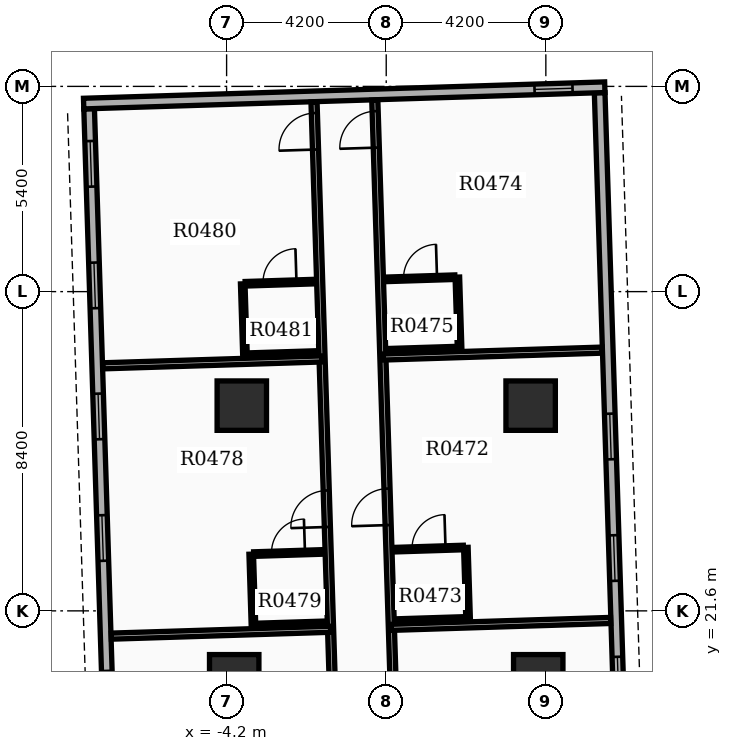
"""IFC4 building model, lengths in metres.
Left out: names, types, materials, properties, quantities, classifications, styles, units other than length and angle.
Written with IfcOpenShell. Run it as: python <this file> out.ifc"""

import sys

from ifc_helpers import new_model, si_unit, direction, frame, frame_2d, origin, origin_2d, place, context, subcontext, project, spatial, rectangle, extrude, element, fill, save


model = new_model("IFC4")
c1 = context("Model", 3, precision=1e-05, world=origin(), true_north=direction((0.0, 1.0)))
c2 = subcontext(c1, "Body", "Model", "MODEL_VIEW")
j1 = project(units=[si_unit("LENGTHUNIT", "METRE"), si_unit("PLANEANGLEUNIT", "RADIAN")], contexts=[c1])
p1 = place(None, origin())
s1 = spatial("IfcSite", under=j1, at=p1, CompositionType="ELEMENT")
p2 = place(p1, origin())
s2 = spatial("IfcBuilding", under=s1, at=p2, CompositionType="ELEMENT")
p3 = place(p2, frame((0.0, 0.0, 31.5)))
s3 = spatial("IfcBuildingStorey", under=s2, at=p3, CompositionType="ELEMENT", Elevation=31.5)
for number, where, z_axis, x_axis in (
    (1, (-4.0, 19.8, 0.0), (0.0, 0.0, 1.0), (1.0, 0.0, 0.0)),
    (2, (4.0, 19.8, 0.0), (0.0, 0.0, 1.0), (1.0, 0.0, 0.0)),
    (3, (-3.8, 27.0, 0.0), (0.0, 0.0, 1.0), (1.0, 0.0, 0.0)),
    (4, (3.8, 27.0, 0.0), (0.0, 0.0, 1.0), (1.0, 0.0, 0.0)),
):
    element("IfcColumn", number, at=place(p3, frame(where, z_axis=z_axis, x_axis=x_axis)), inside=s3, PredefinedType="COLUMN", context=c2, shape_type="SweptSolid", body=[
        extrude(rectangle(XDim=1.3, YDim=1.3, at=origin_2d()), origin(), (0.0, 0.0, 1.0), 3.9),
    ])
p4 = place(p3, frame((6.247, 15.144, 0.0), z_axis=(0.0, 0.0, 1.0), x_axis=(-0.031398187845, 0.999506955354, 0.0)))
e5 = element("IfcWall", 5, at=p4, inside=s3, PredefinedType="STANDARD", context=c2, shape_type="SweptSolid", body=[
    extrude(rectangle(XDim=20.1, YDim=0.28, at=frame_2d((10.05, 0.0))), origin(), (0.0, 0.0, 1.0), 2.91),
])
p5 = place(p4, frame((0.85, 0.0, 0.8)))
e6 = element("IfcOpeningElement", 6, at=p5, cuts=e5, PredefinedType="OPENING", context=c2, shape_type="SweptSolid", body=[
    extrude(rectangle(XDim=1.2, YDim=1.6, at=frame_2d((0.6, 0.8))), frame((0.0, 0.15, 0.0), z_axis=(0.0, -1.0, 0.0), x_axis=(1.0, 0.0, 0.0)), (0.0, 0.0, 1.0), 0.3),
])
p6 = place(p4, frame((4.05, 0.0, 0.8)))
e7 = element("IfcOpeningElement", 7, at=p6, cuts=e5, PredefinedType="OPENING", context=c2, shape_type="SweptSolid", body=[
    extrude(rectangle(XDim=1.2, YDim=1.6, at=frame_2d((0.6, 0.8))), frame((0.0, 0.15, 0.0), z_axis=(0.0, -1.0, 0.0), x_axis=(1.0, 0.0, 0.0)), (0.0, 0.0, 1.0), 0.3),
])
p7 = place(p4, frame((7.25, 0.0, 0.8)))
e8 = element("IfcOpeningElement", 8, at=p7, cuts=e5, PredefinedType="OPENING", context=c2, shape_type="SweptSolid", body=[
    extrude(rectangle(XDim=1.2, YDim=1.6, at=frame_2d((0.6, 0.8))), frame((0.0, 0.15, 0.0), z_axis=(0.0, -1.0, 0.0), x_axis=(1.0, 0.0, 0.0)), (0.0, 0.0, 1.0), 0.3),
])
p8 = place(p4, frame((10.45, 0.0, 0.8)))
e9 = element("IfcOpeningElement", 9, at=p8, cuts=e5, PredefinedType="OPENING", context=c2, shape_type="SweptSolid", body=[
    extrude(rectangle(XDim=1.2, YDim=1.6, at=frame_2d((0.6, 0.8))), frame((0.0, 0.15, 0.0), z_axis=(0.0, -1.0, 0.0), x_axis=(1.0, 0.0, 0.0)), (0.0, 0.0, 1.0), 0.3),
])
p9 = place(p3, frame((-7.817, 34.812, 0.0), z_axis=(0.0, 0.0, 1.0), x_axis=(0.031410322165, -0.999506574096, 0.0)))
e10 = element("IfcWall", 10, at=p9, inside=s3, PredefinedType="STANDARD", context=c2, shape_type="SweptSolid", body=[
    extrude(rectangle(XDim=20.1, YDim=0.28, at=frame_2d((10.05, 0.0))), origin(), (0.0, 0.0, 1.0), 2.91),
])
p10 = place(p9, frame((0.85, 0.0, 0.8)))
e11 = element("IfcOpeningElement", 11, at=p10, cuts=e10, PredefinedType="OPENING", context=c2, shape_type="SweptSolid", body=[
    extrude(rectangle(XDim=1.2, YDim=1.6, at=frame_2d((0.6, 0.8))), frame((0.0, 0.15, 0.0), z_axis=(0.0, -1.0, 0.0), x_axis=(1.0, 0.0, 0.0)), (0.0, 0.0, 1.0), 0.3),
])
p11 = place(p9, frame((4.05, 0.0, 0.8)))
e12 = element("IfcOpeningElement", 12, at=p11, cuts=e10, PredefinedType="OPENING", context=c2, shape_type="SweptSolid", body=[
    extrude(rectangle(XDim=1.2, YDim=1.6, at=frame_2d((0.6, 0.8))), frame((0.0, 0.15, 0.0), z_axis=(0.0, -1.0, 0.0), x_axis=(1.0, 0.0, 0.0)), (0.0, 0.0, 1.0), 0.3),
])
p12 = place(p9, frame((7.5, 0.0, 0.8)))
e13 = element("IfcOpeningElement", 13, at=p12, cuts=e10, PredefinedType="OPENING", context=c2, shape_type="SweptSolid", body=[
    extrude(rectangle(XDim=1.2, YDim=1.6, at=frame_2d((0.6, 0.8))), frame((0.0, 0.15, 0.0), z_axis=(0.0, -1.0, 0.0), x_axis=(1.0, 0.0, 0.0)), (0.0, 0.0, 1.0), 0.3),
])
p13 = place(p9, frame((10.7, 0.0, 0.8)))
e14 = element("IfcOpeningElement", 14, at=p13, cuts=e10, PredefinedType="OPENING", context=c2, shape_type="SweptSolid", body=[
    extrude(rectangle(XDim=1.2, YDim=1.6, at=frame_2d((0.6, 0.8))), frame((0.0, 0.15, 0.0), z_axis=(0.0, -1.0, 0.0), x_axis=(1.0, 0.0, 0.0)), (0.0, 0.0, 1.0), 0.3),
])
p14 = place(p9, frame((14.799, 0.0, 0.85)))
e15 = element("IfcOpeningElement", 15, at=p14, cuts=e10, PredefinedType="OPENING", context=c2, shape_type="SweptSolid", body=[
    extrude(rectangle(XDim=1.2, YDim=1.6, at=frame_2d((0.6, 0.8))), frame((0.0, 0.15, 0.0), z_axis=(0.0, -1.0, 0.0), x_axis=(1.0, 0.0, 0.0)), (0.0, 0.0, 1.0), 0.3),
])
p15 = place(p3, frame((5.752, 35.378, 0.0), z_axis=(0.0, 0.0, 1.0), x_axis=(-0.999506679556, -0.031406966164, 0.0)))
e16 = element("IfcWall", 16, at=p15, inside=s3, PredefinedType="STANDARD", context=c2, shape_type="SweptSolid", body=[
    extrude(rectangle(XDim=13.72, YDim=0.28, at=frame_2d((6.86, 0.0))), origin(), (0.0, 0.0, 1.0), 2.91),
])
p16 = place(p15, frame((0.85, 0.0, 0.85)))
e17 = element("IfcOpeningElement", 17, at=p16, cuts=e16, PredefinedType="OPENING", context=c2, shape_type="SweptSolid", body=[
    extrude(rectangle(XDim=1.0, YDim=1.5, at=frame_2d((0.5, 0.75))), frame((0.0, 0.15, 0.0), z_axis=(0.0, -1.0, 0.0), x_axis=(1.0, 0.0, 0.0)), (0.0, 0.0, 1.0), 0.3),
])
p17 = place(p3, frame((0.333, 14.868, 0.0), z_axis=(0.0, 0.0, 1.0), x_axis=(-0.031416030536, 0.99950639469, 0.0)))
e18 = element("IfcWall", 18, at=p17, inside=s3, PredefinedType="PARTITIONING", context=c2, shape_type="SweptSolid", body=[
    extrude(rectangle(XDim=20.182, YDim=0.16, at=frame_2d((10.091, 0.0))), origin(), (0.0, 0.0, 1.0), 2.9),
])
p18 = place(p17, frame((2.61, 0.0, 0.0)))
e19 = element("IfcOpeningElement", 19, at=p18, cuts=e18, PredefinedType="OPENING", context=c2, shape_type="SweptSolid", body=[
    extrude(rectangle(XDim=0.96, YDim=2.15, at=frame_2d((0.48, 1.075))), frame((0.0, 0.09, 0.0), z_axis=(0.0, -1.0, 0.0), x_axis=(1.0, 0.0, 0.0)), (0.0, 0.0, 1.0), 0.18),
])
p19 = place(p17, frame((8.994, 0.0, 0.0)))
e20 = element("IfcOpeningElement", 20, at=p19, cuts=e18, PredefinedType="OPENING", context=c2, shape_type="SweptSolid", body=[
    extrude(rectangle(XDim=0.96, YDim=2.15, at=frame_2d((0.48, 1.075))), frame((0.0, 0.09, 0.0), z_axis=(0.0, -1.0, 0.0), x_axis=(1.0, 0.0, 0.0)), (0.0, 0.0, 1.0), 0.18),
])
p20 = place(p17, frame((18.93, 0.0, 0.0)))
e21 = element("IfcOpeningElement", 21, at=p20, cuts=e18, PredefinedType="OPENING", context=c2, shape_type="SweptSolid", body=[
    extrude(rectangle(XDim=0.96, YDim=2.15, at=frame_2d((0.48, 1.075))), frame((0.0, 0.09, 0.0), z_axis=(0.0, -1.0, 0.0), x_axis=(1.0, 0.0, 0.0)), (0.0, 0.0, 1.0), 0.18),
])
p21 = place(p3, frame((0.135, 21.167, 0.0), z_axis=(0.0, 0.0, 1.0), x_axis=(0.999507360361, 0.031385292484, 0.0)))
e22 = element("IfcWall", 22, at=p21, inside=s3, PredefinedType="PARTITIONING", context=c2, shape_type="SweptSolid", body=[
    extrude(rectangle(XDim=5.772, YDim=0.16, at=frame_2d((2.886, 0.0))), origin(), (0.0, 0.0, 1.0), 2.9),
])
p22 = place(p3, frame((-0.088, 28.279, 0.0), z_axis=(0.0, 0.0, 1.0), x_axis=(0.999507402024, 0.031383965651, 0.0)))
e23 = element("IfcWall", 23, at=p22, inside=s3, PredefinedType="PARTITIONING", context=c2, shape_type="SweptSolid", body=[
    extrude(rectangle(XDim=5.772, YDim=0.16, at=frame_2d((2.886, 0.0))), origin(), (0.0, 0.0, 1.0), 2.9),
])
p23 = place(p3, frame((0.211, 23.21, 0.0), z_axis=(0.0, 0.0, 1.0), x_axis=(0.999511421504, 0.031255692016, 0.0)))
e24 = element("IfcWall", 24, at=p23, inside=s3, PredefinedType="PARTITIONING", context=c2, shape_type="SweptSolid", body=[
    extrude(rectangle(XDim=1.82, YDim=0.12, at=frame_2d((0.91, 0.0))), origin(), (0.0, 0.0, 1.0), 2.9),
])
p24 = place(p23, frame((0.47, 0.0, 0.0)))
e25 = element("IfcOpeningElement", 25, at=p24, cuts=e24, PredefinedType="OPENING", context=c2, shape_type="SweptSolid", body=[
    extrude(rectangle(XDim=0.88, YDim=2.1, at=frame_2d((0.44, 1.05))), frame((0.0, 0.07, 0.0), z_axis=(0.0, -1.0, 0.0), x_axis=(1.0, 0.0, 0.0)), (0.0, 0.0, 1.0), 0.14),
])
p25 = place(p3, frame((0.27, 21.331, 0.0), z_axis=(0.0, 0.0, 1.0), x_axis=(0.999507221803, 0.031389704724, 0.0)))
e26 = element("IfcWall", 26, at=p25, inside=s3, PredefinedType="PARTITIONING", context=c2, shape_type="SweptSolid", body=[
    extrude(rectangle(XDim=1.82, YDim=0.12, at=frame_2d((0.91, 0.0))), origin(), (0.0, 0.0, 1.0), 2.9),
])
p26 = place(p3, frame((2.154, 21.39, 0.0), z_axis=(0.0, 0.0, 1.0), x_axis=(-0.031425292588, 0.999506103526, 0.0)))
e27 = element("IfcWall", 27, at=p26, inside=s3, PredefinedType="PARTITIONING", context=c2, shape_type="SweptSolid", body=[
    extrude(rectangle(XDim=1.88, YDim=0.12, at=frame_2d((0.94, 0.0))), origin(), (0.0, 0.0, 1.0), 2.9),
])
p27 = place(p3, frame((-0.012, 30.323, 0.0), z_axis=(0.0, 0.0, 1.0), x_axis=(0.999507221803, 0.031389704724, 0.0)))
e28 = element("IfcWall", 28, at=p27, inside=s3, PredefinedType="PARTITIONING", context=c2, shape_type="SweptSolid", body=[
    extrude(rectangle(XDim=1.82, YDim=0.12, at=frame_2d((0.91, 0.0))), origin(), (0.0, 0.0, 1.0), 2.9),
])
p28 = place(p27, frame((0.47, 0.0, 0.0)))
e29 = element("IfcOpeningElement", 29, at=p28, cuts=e28, PredefinedType="OPENING", context=c2, shape_type="SweptSolid", body=[
    extrude(rectangle(XDim=0.88, YDim=2.1, at=frame_2d((0.44, 1.05))), frame((0.0, 0.07, 0.0), z_axis=(0.0, -1.0, 0.0), x_axis=(1.0, 0.0, 0.0)), (0.0, 0.0, 1.0), 0.14),
])
p29 = place(p3, frame((0.047, 28.444, 0.0), z_axis=(0.0, 0.0, 1.0), x_axis=(0.999507221803, 0.031389704724, 0.0)))
e30 = element("IfcWall", 30, at=p29, inside=s3, PredefinedType="PARTITIONING", context=c2, shape_type="SweptSolid", body=[
    extrude(rectangle(XDim=1.82, YDim=0.12, at=frame_2d((0.91, 0.0))), origin(), (0.0, 0.0, 1.0), 2.9),
])
p30 = place(p3, frame((1.931, 28.503, 0.0), z_axis=(0.0, 0.0, 1.0), x_axis=(-0.031425292588, 0.999506103526, 0.0)))
e31 = element("IfcWall", 31, at=p30, inside=s3, PredefinedType="PARTITIONING", context=c2, shape_type="SweptSolid", body=[
    extrude(rectangle(XDim=1.88, YDim=0.12, at=frame_2d((0.94, 0.0))), origin(), (0.0, 0.0, 1.0), 2.9),
])
p31 = place(p3, frame((-1.266, 14.817, 0.0), z_axis=(0.0, 0.0, 1.0), x_axis=(-0.031403565719, 0.9995067864, 0.0)))
e32 = element("IfcWall", 32, at=p31, inside=s3, PredefinedType="PARTITIONING", context=c2, shape_type="SweptSolid", body=[
    extrude(rectangle(XDim=20.182, YDim=0.16, at=frame_2d((10.091, 0.0))), origin(), (0.0, 0.0, 1.0), 2.9),
])
p32 = place(p31, frame((2.61, 0.0, 0.0)))
e33 = element("IfcOpeningElement", 33, at=p32, cuts=e32, PredefinedType="OPENING", context=c2, shape_type="SweptSolid", body=[
    extrude(rectangle(XDim=0.96, YDim=2.15, at=frame_2d((0.48, 1.075))), frame((0.0, 0.09, 0.0), z_axis=(0.0, -1.0, 0.0), x_axis=(1.0, 0.0, 0.0)), (0.0, 0.0, 1.0), 0.18),
])
p33 = place(p31, frame((8.994, 0.0, 0.0)))
e34 = element("IfcOpeningElement", 34, at=p33, cuts=e32, PredefinedType="OPENING", context=c2, shape_type="SweptSolid", body=[
    extrude(rectangle(XDim=0.96, YDim=2.15, at=frame_2d((0.48, 1.075))), frame((0.0, 0.09, 0.0), z_axis=(0.0, -1.0, 0.0), x_axis=(1.0, 0.0, 0.0)), (0.0, 0.0, 1.0), 0.18),
])
p34 = place(p31, frame((18.93, 0.0, 0.0)))
e35 = element("IfcOpeningElement", 35, at=p34, cuts=e32, PredefinedType="OPENING", context=c2, shape_type="SweptSolid", body=[
    extrude(rectangle(XDim=0.96, YDim=2.15, at=frame_2d((0.48, 1.075))), frame((0.0, 0.09, 0.0), z_axis=(0.0, -1.0, 0.0), x_axis=(1.0, 0.0, 0.0)), (0.0, 0.0, 1.0), 0.18),
])
p35 = place(p3, frame((-1.464, 21.116, 0.0), z_axis=(0.0, 0.0, 1.0), x_axis=(-0.999506032581, -0.031427548972, 0.0)))
e36 = element("IfcWall", 36, at=p35, inside=s3, PredefinedType="PARTITIONING", context=c2, shape_type="SweptSolid", body=[
    extrude(rectangle(XDim=5.772, YDim=0.16, at=frame_2d((2.886, 0.0))), origin(), (0.0, 0.0, 1.0), 2.9),
])
p36 = place(p3, frame((-1.688, 28.229, 0.0), z_axis=(0.0, 0.0, 1.0), x_axis=(-0.999506074356, -0.031426220357, 0.0)))
e37 = element("IfcWall", 37, at=p36, inside=s3, PredefinedType="PARTITIONING", context=c2, shape_type="SweptSolid", body=[
    extrude(rectangle(XDim=5.772, YDim=0.16, at=frame_2d((2.886, 0.0))), origin(), (0.0, 0.0, 1.0), 2.9),
])
p37 = place(p3, frame((-3.487, 23.094, 0.0), z_axis=(0.0, 0.0, 1.0), x_axis=(0.999511421504, 0.031255692016, 0.0)))
e38 = element("IfcWall", 38, at=p37, inside=s3, PredefinedType="PARTITIONING", context=c2, shape_type="SweptSolid", body=[
    extrude(rectangle(XDim=1.82, YDim=0.12, at=frame_2d((0.91, 0.0))), origin(), (0.0, 0.0, 1.0), 2.9),
])
p38 = place(p37, frame((0.47, 0.0, 0.0)))
e39 = element("IfcOpeningElement", 39, at=p38, cuts=e38, PredefinedType="OPENING", context=c2, shape_type="SweptSolid", body=[
    extrude(rectangle(XDim=0.88, YDim=2.1, at=frame_2d((0.44, 1.05))), frame((0.0, 0.07, 0.0), z_axis=(0.0, -1.0, 0.0), x_axis=(1.0, 0.0, 0.0)), (0.0, 0.0, 1.0), 0.14),
])
p39 = place(p3, frame((-3.428, 21.215, 0.0), z_axis=(0.0, 0.0, 1.0), x_axis=(0.999507221803, 0.031389704724, 0.0)))
e40 = element("IfcWall", 40, at=p39, inside=s3, PredefinedType="PARTITIONING", context=c2, shape_type="SweptSolid", body=[
    extrude(rectangle(XDim=1.82, YDim=0.12, at=frame_2d((0.91, 0.0))), origin(), (0.0, 0.0, 1.0), 2.9),
])
p40 = place(p3, frame((-3.493, 21.213, 0.0), z_axis=(0.0, 0.0, 1.0), x_axis=(-0.031425292588, 0.999506103526, 0.0)))
e41 = element("IfcWall", 41, at=p40, inside=s3, PredefinedType="PARTITIONING", context=c2, shape_type="SweptSolid", body=[
    extrude(rectangle(XDim=1.88, YDim=0.12, at=frame_2d((0.94, 0.0))), origin(), (0.0, 0.0, 1.0), 2.9),
])
p41 = place(p3, frame((-3.711, 30.206, 0.0), z_axis=(0.0, 0.0, 1.0), x_axis=(0.999507221803, 0.031389704724, 0.0)))
e42 = element("IfcWall", 42, at=p41, inside=s3, PredefinedType="PARTITIONING", context=c2, shape_type="SweptSolid", body=[
    extrude(rectangle(XDim=1.82, YDim=0.12, at=frame_2d((0.91, 0.0))), origin(), (0.0, 0.0, 1.0), 2.9),
])
p42 = place(p41, frame((0.47, 0.0, 0.0)))
e43 = element("IfcOpeningElement", 43, at=p42, cuts=e42, PredefinedType="OPENING", context=c2, shape_type="SweptSolid", body=[
    extrude(rectangle(XDim=0.88, YDim=2.1, at=frame_2d((0.44, 1.05))), frame((0.0, 0.07, 0.0), z_axis=(0.0, -1.0, 0.0), x_axis=(1.0, 0.0, 0.0)), (0.0, 0.0, 1.0), 0.14),
])
p43 = place(p3, frame((-3.652, 28.327, 0.0), z_axis=(0.0, 0.0, 1.0), x_axis=(0.999507221803, 0.031389704724, 0.0)))
e44 = element("IfcWall", 44, at=p43, inside=s3, PredefinedType="PARTITIONING", context=c2, shape_type="SweptSolid", body=[
    extrude(rectangle(XDim=1.82, YDim=0.12, at=frame_2d((0.91, 0.0))), origin(), (0.0, 0.0, 1.0), 2.9),
])
p44 = place(p3, frame((-3.717, 28.325, 0.0), z_axis=(0.0, 0.0, 1.0), x_axis=(-0.031425292588, 0.999506103526, 0.0)))
e45 = element("IfcWall", 45, at=p44, inside=s3, PredefinedType="PARTITIONING", context=c2, shape_type="SweptSolid", body=[
    extrude(rectangle(XDim=1.88, YDim=0.12, at=frame_2d((0.94, 0.0))), origin(), (0.0, 0.0, 1.0), 2.9),
])
p45 = place(p6, origin())
e46 = element("IfcWindow", 46, at=p45, inside=s3, PartitioningType="SINGLE_PANEL", PredefinedType="WINDOW", context=c2, shape_type="SweptSolid", body=[
    extrude(rectangle(XDim=1.2, YDim=1.6, at=frame_2d((0.6, 0.8))), frame((0.0, 0.03, 0.0), z_axis=(0.0, -1.0, 0.0), x_axis=(1.0, 0.0, 0.0)), (0.0, 0.0, 1.0), 0.06),
])
fill(e7, e46)
p46 = place(p7, origin())
e47 = element("IfcWindow", 47, at=p46, inside=s3, PartitioningType="SINGLE_PANEL", PredefinedType="WINDOW", context=c2, shape_type="SweptSolid", body=[
    extrude(rectangle(XDim=1.2, YDim=1.6, at=frame_2d((0.6, 0.8))), frame((0.0, 0.03, 0.0), z_axis=(0.0, -1.0, 0.0), x_axis=(1.0, 0.0, 0.0)), (0.0, 0.0, 1.0), 0.06),
])
fill(e8, e47)
p47 = place(p8, origin())
e48 = element("IfcWindow", 48, at=p47, inside=s3, PartitioningType="SINGLE_PANEL", PredefinedType="WINDOW", context=c2, shape_type="SweptSolid", body=[
    extrude(rectangle(XDim=1.2, YDim=1.6, at=frame_2d((0.6, 0.8))), frame((0.0, 0.03, 0.0), z_axis=(0.0, -1.0, 0.0), x_axis=(1.0, 0.0, 0.0)), (0.0, 0.0, 1.0), 0.06),
])
fill(e9, e48)
p48 = place(p10, origin())
e49 = element("IfcWindow", 49, at=p48, inside=s3, PartitioningType="SINGLE_PANEL", PredefinedType="WINDOW", context=c2, shape_type="SweptSolid", body=[
    extrude(rectangle(XDim=1.2, YDim=1.6, at=frame_2d((0.6, 0.8))), frame((0.0, 0.03, 0.0), z_axis=(0.0, -1.0, 0.0), x_axis=(1.0, 0.0, 0.0)), (0.0, 0.0, 1.0), 0.06),
])
fill(e11, e49)
p49 = place(p11, origin())
e50 = element("IfcWindow", 50, at=p49, inside=s3, PartitioningType="SINGLE_PANEL", PredefinedType="WINDOW", context=c2, shape_type="SweptSolid", body=[
    extrude(rectangle(XDim=1.2, YDim=1.6, at=frame_2d((0.6, 0.8))), frame((0.0, 0.03, 0.0), z_axis=(0.0, -1.0, 0.0), x_axis=(1.0, 0.0, 0.0)), (0.0, 0.0, 1.0), 0.06),
])
fill(e12, e50)
p50 = place(p12, origin())
e51 = element("IfcWindow", 51, at=p50, inside=s3, PartitioningType="SINGLE_PANEL", PredefinedType="WINDOW", context=c2, shape_type="SweptSolid", body=[
    extrude(rectangle(XDim=1.2, YDim=1.6, at=frame_2d((0.6, 0.8))), frame((0.0, 0.03, 0.0), z_axis=(0.0, -1.0, 0.0), x_axis=(1.0, 0.0, 0.0)), (0.0, 0.0, 1.0), 0.06),
])
fill(e13, e51)
p51 = place(p13, origin())
e52 = element("IfcWindow", 52, at=p51, inside=s3, PartitioningType="SINGLE_PANEL", PredefinedType="WINDOW", context=c2, shape_type="SweptSolid", body=[
    extrude(rectangle(XDim=1.2, YDim=1.6, at=frame_2d((0.6, 0.8))), frame((0.0, 0.03, 0.0), z_axis=(0.0, -1.0, 0.0), x_axis=(1.0, 0.0, 0.0)), (0.0, 0.0, 1.0), 0.06),
])
fill(e14, e52)
p52 = place(p16, origin())
e53 = element("IfcWindow", 53, at=p52, inside=s3, PartitioningType="SINGLE_PANEL", PredefinedType="WINDOW", context=c2, shape_type="SweptSolid", body=[
    extrude(rectangle(XDim=1.0, YDim=1.5, at=frame_2d((0.5, 0.75))), frame((0.0, 0.03, 0.0), z_axis=(0.0, -1.0, 0.0), x_axis=(1.0, 0.0, 0.0)), (0.0, 0.0, 1.0), 0.06),
])
fill(e17, e53)
p53 = place(p14, origin())
e54 = element("IfcWindow", 54, at=p53, inside=s3, PartitioningType="SINGLE_PANEL", PredefinedType="WINDOW", context=c2, shape_type="SweptSolid", body=[
    extrude(rectangle(XDim=1.2, YDim=1.6, at=frame_2d((0.6, 0.8))), frame((0.0, 0.03, 0.0), z_axis=(0.0, -1.0, 0.0), x_axis=(1.0, 0.0, 0.0)), (0.0, 0.0, 1.0), 0.06),
])
fill(e15, e54)
p54 = place(p19, origin())
e55 = element("IfcDoor", 55, at=p54, inside=s3, OperationType="SINGLE_SWING_LEFT", PredefinedType="DOOR", context=c2, shape_type="SweptSolid", body=[
    extrude(rectangle(XDim=0.96, YDim=2.15, at=frame_2d((0.48, 1.075))), frame((0.0, 0.025, 0.0), z_axis=(0.0, -1.0, 0.0), x_axis=(1.0, 0.0, 0.0)), (0.0, 0.0, 1.0), 0.05),
])
fill(e20, e55)
p55 = place(p24, origin())
e56 = element("IfcDoor", 56, at=p55, inside=s3, OperationType="SINGLE_SWING_RIGHT", PredefinedType="DOOR", context=c2, shape_type="SweptSolid", body=[
    extrude(rectangle(XDim=0.88, YDim=2.1, at=frame_2d((0.44, 1.05))), frame((0.0, 0.025, 0.0), z_axis=(0.0, -1.0, 0.0), x_axis=(1.0, 0.0, 0.0)), (0.0, 0.0, 1.0), 0.05),
])
fill(e25, e56)
p56 = place(p20, origin())
e57 = element("IfcDoor", 57, at=p56, inside=s3, OperationType="SINGLE_SWING_LEFT", PredefinedType="DOOR", context=c2, shape_type="SweptSolid", body=[
    extrude(rectangle(XDim=0.96, YDim=2.15, at=frame_2d((0.48, 1.075))), frame((0.0, 0.025, 0.0), z_axis=(0.0, -1.0, 0.0), x_axis=(1.0, 0.0, 0.0)), (0.0, 0.0, 1.0), 0.05),
])
fill(e21, e57)
p57 = place(p28, origin())
e58 = element("IfcDoor", 58, at=p57, inside=s3, OperationType="SINGLE_SWING_RIGHT", PredefinedType="DOOR", context=c2, shape_type="SweptSolid", body=[
    extrude(rectangle(XDim=0.88, YDim=2.1, at=frame_2d((0.44, 1.05))), frame((0.0, 0.025, 0.0), z_axis=(0.0, -1.0, 0.0), x_axis=(1.0, 0.0, 0.0)), (0.0, 0.0, 1.0), 0.05),
])
fill(e29, e58)
p58 = place(p33, origin())
e59 = element("IfcDoor", 59, at=p58, inside=s3, OperationType="SINGLE_SWING_LEFT", PredefinedType="DOOR", context=c2, shape_type="SweptSolid", body=[
    extrude(rectangle(XDim=0.96, YDim=2.15, at=frame_2d((0.48, 1.075))), frame((0.0, 0.025, 0.0), z_axis=(0.0, -1.0, 0.0), x_axis=(1.0, 0.0, 0.0)), (0.0, 0.0, 1.0), 0.05),
])
fill(e34, e59)
p59 = place(p38, origin())
e60 = element("IfcDoor", 60, at=p59, inside=s3, OperationType="SINGLE_SWING_RIGHT", PredefinedType="DOOR", context=c2, shape_type="SweptSolid", body=[
    extrude(rectangle(XDim=0.88, YDim=2.1, at=frame_2d((0.44, 1.05))), frame((0.0, 0.025, 0.0), z_axis=(0.0, -1.0, 0.0), x_axis=(1.0, 0.0, 0.0)), (0.0, 0.0, 1.0), 0.05),
])
fill(e39, e60)
p60 = place(p34, origin())
e61 = element("IfcDoor", 61, at=p60, inside=s3, OperationType="SINGLE_SWING_LEFT", PredefinedType="DOOR", context=c2, shape_type="SweptSolid", body=[
    extrude(rectangle(XDim=0.96, YDim=2.15, at=frame_2d((0.48, 1.075))), frame((0.0, 0.025, 0.0), z_axis=(0.0, -1.0, 0.0), x_axis=(1.0, 0.0, 0.0)), (0.0, 0.0, 1.0), 0.05),
])
fill(e35, e61)
p61 = place(p42, origin())
e62 = element("IfcDoor", 62, at=p61, inside=s3, OperationType="SINGLE_SWING_RIGHT", PredefinedType="DOOR", context=c2, shape_type="SweptSolid", body=[
    extrude(rectangle(XDim=0.88, YDim=2.1, at=frame_2d((0.44, 1.05))), frame((0.0, 0.025, 0.0), z_axis=(0.0, -1.0, 0.0), x_axis=(1.0, 0.0, 0.0)), (0.0, 0.0, 1.0), 0.05),
])
fill(e43, e62)
save(model, sys.argv[1])
